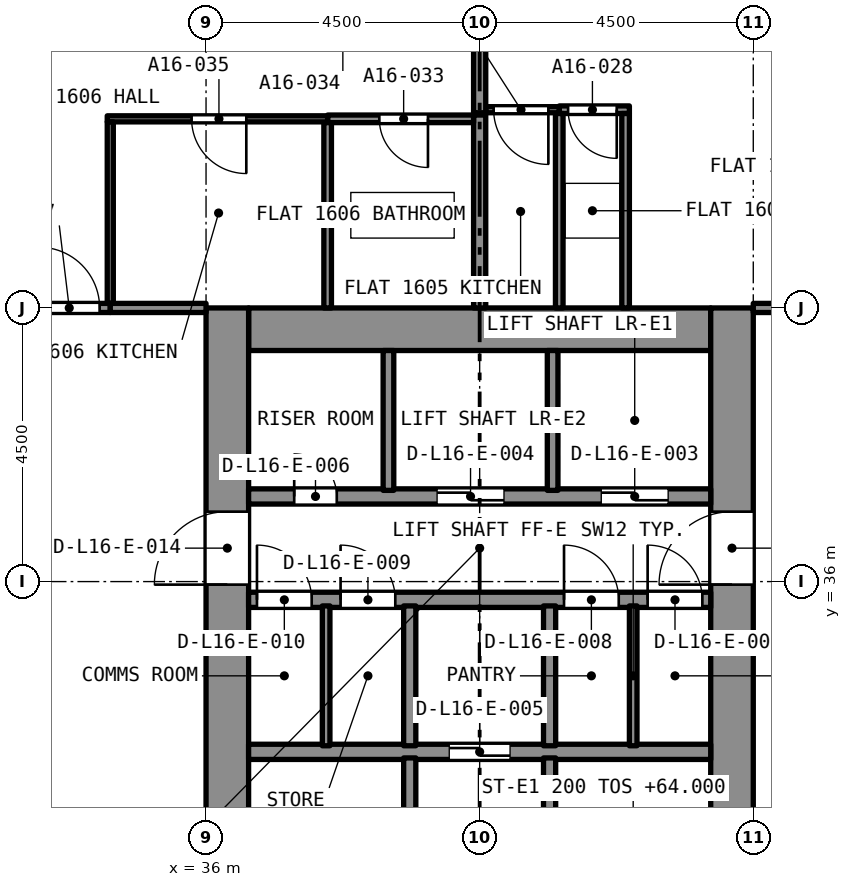
"""IFC4 building model, lengths in metres.
Left out: names, types, materials, properties, quantities, classifications, styles, units other than length and angle.
Written with IfcOpenShell. Run it as: python <this file> out.ifc"""

import sys

from ifc_helpers import new_model, si_unit, direction, frame, frame_2d, origin, place, context, subcontext, project, spatial, rectangle, extrude, element, fill, save


model = new_model("IFC4")
c1 = context("Model", 3, precision=1e-05, world=origin(), true_north=direction((0.0, 1.0)))
c2 = subcontext(c1, "Body", "Model", "MODEL_VIEW")
j1 = project(units=[si_unit("LENGTHUNIT", "METRE"), si_unit("PLANEANGLEUNIT", "RADIAN")], contexts=[c1])
p1 = place(None, origin())
s1 = spatial("IfcSite", under=j1, at=p1, CompositionType="ELEMENT")
p2 = place(p1, origin())
s2 = spatial("IfcBuilding", under=s1, at=p2, CompositionType="ELEMENT")
p3 = place(p2, frame((0.0, 0.0, 62.4)))
s3 = spatial("IfcBuildingStorey", under=s2, at=p3, CompositionType="ELEMENT", Elevation=62.4)
p4 = place(p3, frame((36.7, 40.15, 0.0), z_axis=(0.0, 0.0, 1.0), x_axis=(1.0, 0.0, 0.0)))
e1 = element("IfcWall", 1, at=p4, inside=s3, PredefinedType="SOLIDWALL", context=c2, shape_type="SweptSolid", body=[
    extrude(rectangle(XDim=7.6, YDim=0.7, at=frame_2d((3.8, 0.0))), origin(), (0.0, 0.0, 1.0), 3.2),
])
p5 = place(p3, frame((36.35, 27.0, 0.0), z_axis=(0.0, 0.0, 1.0), x_axis=(0.0, 1.0, 0.0)))
e2 = element("IfcWall", 2, at=p5, inside=s3, PredefinedType="SOLIDWALL", context=c2, shape_type="SweptSolid", body=[
    extrude(rectangle(XDim=13.5, YDim=0.7, at=frame_2d((6.75, 0.0))), origin(), (0.0, 0.0, 1.0), 3.2),
])
p6 = place(p5, frame((8.95, 0.0, 0.0)))
e3 = element("IfcOpeningElement", 3, at=p6, cuts=e2, PredefinedType="OPENING", context=c2, shape_type="SweptSolid", body=[
    extrude(rectangle(XDim=1.2, YDim=2.1, at=frame_2d((0.6, 1.05))), frame((0.0, 0.36, 0.0), z_axis=(0.0, -1.0, 0.0), x_axis=(1.0, 0.0, 0.0)), (0.0, 0.0, 1.0), 0.72),
])
p7 = place(p3, frame((44.65, 27.0, 0.0), z_axis=(0.0, 0.0, 1.0), x_axis=(0.0, 1.0, 0.0)))
e4 = element("IfcWall", 4, at=p7, inside=s3, PredefinedType="SOLIDWALL", context=c2, shape_type="SweptSolid", body=[
    extrude(rectangle(XDim=13.5, YDim=0.7, at=frame_2d((6.75, 0.0))), origin(), (0.0, 0.0, 1.0), 3.2),
])
p8 = place(p7, frame((8.95, 0.0, 0.0)))
e5 = element("IfcOpeningElement", 5, at=p8, cuts=e4, PredefinedType="OPENING", context=c2, shape_type="SweptSolid", body=[
    extrude(rectangle(XDim=1.2, YDim=2.1, at=frame_2d((0.6, 1.05))), frame((0.0, 0.36, 0.0), z_axis=(0.0, -1.0, 0.0), x_axis=(1.0, 0.0, 0.0)), (0.0, 0.0, 1.0), 0.72),
])
p9 = place(p3, frame((42.962, 43.76, 0.0), z_axis=(0.0, 0.0, 1.0), x_axis=(-1.0, 0.0, 0.0)))
e6 = element("IfcWall", 6, at=p9, inside=s3, PredefinedType="PARTITIONING", context=c2, shape_type="SweptSolid", body=[
    extrude(rectangle(XDim=1.153, YDim=0.125, at=frame_2d((0.577, 0.0))), origin(), (0.0, 0.0, 1.0), 2.9),
])
p10 = place(p9, frame((0.208, 0.0, 0.0)))
e7 = element("IfcOpeningElement", 7, at=p10, cuts=e6, PredefinedType="OPENING", context=c2, shape_type="SweptSolid", body=[
    extrude(rectangle(XDim=0.8, YDim=2.1, at=frame_2d((0.4, 1.05))), frame((0.0, 0.073, 0.0), z_axis=(0.0, -1.0, 0.0), x_axis=(1.0, 0.0, 0.0)), (0.0, 0.0, 1.0), 0.145),
])
for number, where, z_axis, x_axis in (
    (8, (42.9, 40.5, 0.0), (0.0, 0.0, 1.0), (0.0, 1.0, 0.0)),
    (9, (41.809, 40.5, 0.0), (0.0, 0.0, 1.0), (0.0, 1.0, 0.0)),
):
    element("IfcWall", number, at=place(p3, frame(where, z_axis=z_axis, x_axis=x_axis)), inside=s3, PredefinedType="PARTITIONING", context=c2, shape_type="SweptSolid", body=[
        extrude(rectangle(XDim=3.198, YDim=0.125, at=frame_2d((1.599, 0.0))), origin(), (0.0, 0.0, 1.0), 2.9),
    ])
p11 = place(p3, frame((41.809, 43.76, 0.0), z_axis=(0.0, 0.0, 1.0), x_axis=(-1.0, 0.0, 0.0)))
e10 = element("IfcWall", 10, at=p11, inside=s3, PredefinedType="PARTITIONING", context=c2, shape_type="SweptSolid", body=[
    extrude(rectangle(XDim=1.209, YDim=0.1, at=frame_2d((0.604, 0.0))), origin(), (0.0, 0.0, 1.0), 2.9),
])
p12 = place(p11, frame((0.179, 0.0, 0.0)))
e11 = element("IfcOpeningElement", 11, at=p12, cuts=e10, PredefinedType="OPENING", context=c2, shape_type="SweptSolid", body=[
    extrude(rectangle(XDim=0.9, YDim=2.1, at=frame_2d((0.45, 1.05))), frame((0.0, 0.06, 0.0), z_axis=(0.0, -1.0, 0.0), x_axis=(1.0, 0.0, 0.0)), (0.0, 0.0, 1.0), 0.12),
])
p13 = place(p3, frame((40.5, 43.71, 0.0), z_axis=(0.0, 0.0, 1.0), x_axis=(0.0, 1.0, 0.0)))
e12 = element("IfcWall", 12, at=p13, inside=s3, PredefinedType="PARTITIONING", context=c2, shape_type="SweptSolid", body=[
    extrude(rectangle(XDim=1.23, YDim=0.2, at=frame_2d((0.615, 0.0))), origin(), (0.0, 0.0, 1.0), 2.9),
])
p14 = place(p3, frame((45.0, 40.5, 0.0), z_axis=(0.0, 0.0, 1.0), x_axis=(1.0, 0.0, 0.0)))
e13 = element("IfcWall", 13, at=p14, inside=s3, PredefinedType="PARTITIONING", context=c2, shape_type="SweptSolid", body=[
    extrude(rectangle(XDim=3.8, YDim=0.15, at=frame_2d((1.9, 0.0))), origin(), (0.0, 0.0, 1.0), 2.9),
])
p15 = place(p14, frame((1.75, 0.0, 0.0)))
e14 = element("IfcOpeningElement", 14, at=p15, cuts=e13, PredefinedType="OPENING", context=c2, shape_type="SweptSolid", body=[
    extrude(rectangle(XDim=1.0, YDim=2.1, at=frame_2d((0.5, 1.05))), frame((0.0, 0.085, 0.0), z_axis=(0.0, -1.0, 0.0), x_axis=(1.0, 0.0, 0.0)), (0.0, 0.0, 1.0), 0.17),
])
p16 = place(p3, frame((40.5, 40.5, 0.0), z_axis=(0.0, 0.0, 1.0), x_axis=(0.0, 1.0, 0.0)))
e15 = element("IfcWall", 15, at=p16, inside=s3, PredefinedType="PARTITIONING", context=c2, shape_type="SweptSolid", body=[
    extrude(rectangle(XDim=3.173, YDim=0.2, at=frame_2d((1.586, 0.0))), origin(), (0.0, 0.0, 1.0), 2.9),
])
p17 = place(p3, frame((40.4, 43.61, 0.0), z_axis=(0.0, 0.0, 1.0), x_axis=(-1.0, 0.0, 0.0)))
e16 = element("IfcWall", 16, at=p17, inside=s3, PredefinedType="PARTITIONING", context=c2, shape_type="SweptSolid", body=[
    extrude(rectangle(XDim=2.4, YDim=0.125, at=frame_2d((1.2, 0.0))), origin(), (0.0, 0.0, 1.0), 2.9),
])
p18 = place(p17, frame((0.75, 0.0, 0.0)))
e17 = element("IfcOpeningElement", 17, at=p18, cuts=e16, PredefinedType="OPENING", context=c2, shape_type="SweptSolid", body=[
    extrude(rectangle(XDim=0.8, YDim=2.1, at=frame_2d((0.4, 1.05))), frame((0.0, 0.073, 0.0), z_axis=(0.0, -1.0, 0.0), x_axis=(1.0, 0.0, 0.0)), (0.0, 0.0, 1.0), 0.145),
])
p19 = place(p3, frame((38.0, 40.5, 0.0), z_axis=(0.0, 0.0, 1.0), x_axis=(0.0, 1.0, 0.0)))
e18 = element("IfcWall", 18, at=p19, inside=s3, PredefinedType="PARTITIONING", context=c2, shape_type="SweptSolid", body=[
    extrude(rectangle(XDim=3.048, YDim=0.125, at=frame_2d((1.524, 0.0))), origin(), (0.0, 0.0, 1.0), 2.9),
])
p20 = place(p3, frame((38.0, 43.61, 0.0), z_axis=(0.0, 0.0, 1.0), x_axis=(-1.0, 0.0, 0.0)))
e19 = element("IfcWall", 19, at=p20, inside=s3, PredefinedType="PARTITIONING", context=c2, shape_type="SweptSolid", body=[
    extrude(rectangle(XDim=3.625, YDim=0.1, at=frame_2d((1.812, 0.0))), origin(), (0.0, 0.0, 1.0), 2.9),
])
p21 = place(p20, frame((1.337, 0.0, 0.0)))
e20 = element("IfcOpeningElement", 20, at=p21, cuts=e19, PredefinedType="OPENING", context=c2, shape_type="SweptSolid", body=[
    extrude(rectangle(XDim=0.9, YDim=2.1, at=frame_2d((0.45, 1.05))), frame((0.0, 0.06, 0.0), z_axis=(0.0, -1.0, 0.0), x_axis=(1.0, 0.0, 0.0)), (0.0, 0.0, 1.0), 0.12),
])
p22 = place(p3, frame((34.425, 40.575, 0.0), z_axis=(0.0, 0.0, 1.0), x_axis=(0.0, 1.0, 0.0)))
e21 = element("IfcWall", 21, at=p22, inside=s3, PredefinedType="PARTITIONING", context=c2, shape_type="SweptSolid", body=[
    extrude(rectangle(XDim=2.985, YDim=0.1, at=frame_2d((1.493, 0.0))), origin(), (0.0, 0.0, 1.0), 2.9),
])
p23 = place(p3, frame((32.2, 40.5, 0.0), z_axis=(0.0, 0.0, 1.0), x_axis=(1.0, 0.0, 0.0)))
e22 = element("IfcWall", 22, at=p23, inside=s3, PredefinedType="PARTITIONING", context=c2, shape_type="SweptSolid", body=[
    extrude(rectangle(XDim=2.225, YDim=0.15, at=frame_2d((1.113, 0.0))), origin(), (0.0, 0.0, 1.0), 2.9),
])
p24 = place(p23, frame((1.05, 0.0, 0.0)))
e23 = element("IfcOpeningElement", 23, at=p24, cuts=e22, PredefinedType="OPENING", context=c2, shape_type="SweptSolid", body=[
    extrude(rectangle(XDim=1.0, YDim=2.1, at=frame_2d((0.5, 1.05))), frame((0.0, 0.085, 0.0), z_axis=(0.0, -1.0, 0.0), x_axis=(1.0, 0.0, 0.0)), (0.0, 0.0, 1.0), 0.17),
])
p25 = place(p3, frame((34.425, 40.5, 0.0), z_axis=(0.0, 0.0, 1.0), x_axis=(1.0, 0.0, 0.0)))
e24 = element("IfcWall", 24, at=p25, inside=s3, PredefinedType="PARTITIONING", context=c2, shape_type="SweptSolid", body=[
    extrude(rectangle(XDim=1.575, YDim=0.15, at=frame_2d((0.788, 0.0))), origin(), (0.0, 0.0, 1.0), 2.9),
])
p26 = place(p3, frame((36.7, 33.2, 0.0), z_axis=(0.0, 0.0, 1.0), x_axis=(1.0, 0.0, 0.0)))
e25 = element("IfcWall", 25, at=p26, inside=s3, PredefinedType="SOLIDWALL", context=c2, shape_type="SweptSolid", body=[
    extrude(rectangle(XDim=7.6, YDim=0.25, at=frame_2d((3.8, 0.0))), origin(), (0.0, 0.0, 1.0), 2.9),
])
p27 = place(p26, frame((3.3, 0.0, 0.0)))
e26 = element("IfcOpeningElement", 26, at=p27, cuts=e25, PredefinedType="OPENING", context=c2, shape_type="SweptSolid", body=[
    extrude(rectangle(XDim=1.0, YDim=2.1, at=frame_2d((0.5, 1.05))), frame((0.0, 0.135, 0.0), z_axis=(0.0, -1.0, 0.0), x_axis=(1.0, 0.0, 0.0)), (0.0, 0.0, 1.0), 0.27),
])
p28 = place(p3, frame((36.7, 35.7, 0.0), z_axis=(0.0, 0.0, 1.0), x_axis=(1.0, 0.0, 0.0)))
e27 = element("IfcWall", 27, at=p28, inside=s3, PredefinedType="SOLIDWALL", context=c2, shape_type="SweptSolid", body=[
    extrude(rectangle(XDim=7.6, YDim=0.25, at=frame_2d((3.8, 0.0))), origin(), (0.0, 0.0, 1.0), 2.9),
])
p29 = place(p28, frame((6.562, 0.0, 0.0)))
e28 = element("IfcOpeningElement", 28, at=p29, cuts=e27, PredefinedType="OPENING", context=c2, shape_type="SweptSolid", body=[
    extrude(rectangle(XDim=0.9, YDim=2.1, at=frame_2d((0.45, 1.05))), frame((0.0, 0.135, 0.0), z_axis=(0.0, -1.0, 0.0), x_axis=(1.0, 0.0, 0.0)), (0.0, 0.0, 1.0), 0.27),
])
p30 = place(p28, frame((5.188, 0.0, 0.0)))
e29 = element("IfcOpeningElement", 29, at=p30, cuts=e27, PredefinedType="OPENING", context=c2, shape_type="SweptSolid", body=[
    extrude(rectangle(XDim=0.9, YDim=2.1, at=frame_2d((0.45, 1.05))), frame((0.0, 0.135, 0.0), z_axis=(0.0, -1.0, 0.0), x_axis=(1.0, 0.0, 0.0)), (0.0, 0.0, 1.0), 0.27),
])
p31 = place(p28, frame((1.512, 0.0, 0.0)))
e30 = element("IfcOpeningElement", 30, at=p31, cuts=e27, PredefinedType="OPENING", context=c2, shape_type="SweptSolid", body=[
    extrude(rectangle(XDim=0.9, YDim=2.1, at=frame_2d((0.45, 1.05))), frame((0.0, 0.135, 0.0), z_axis=(0.0, -1.0, 0.0), x_axis=(1.0, 0.0, 0.0)), (0.0, 0.0, 1.0), 0.27),
])
p32 = place(p28, frame((0.137, 0.0, 0.0)))
e31 = element("IfcOpeningElement", 31, at=p32, cuts=e27, PredefinedType="OPENING", context=c2, shape_type="SweptSolid", body=[
    extrude(rectangle(XDim=0.9, YDim=2.1, at=frame_2d((0.45, 1.05))), frame((0.0, 0.135, 0.0), z_axis=(0.0, -1.0, 0.0), x_axis=(1.0, 0.0, 0.0)), (0.0, 0.0, 1.0), 0.27),
])
p33 = place(p3, frame((36.7, 37.4, 0.0), z_axis=(0.0, 0.0, 1.0), x_axis=(1.0, 0.0, 0.0)))
e32 = element("IfcWall", 32, at=p33, inside=s3, PredefinedType="SOLIDWALL", context=c2, shape_type="SweptSolid", body=[
    extrude(rectangle(XDim=7.6, YDim=0.25, at=frame_2d((3.8, 0.0))), origin(), (0.0, 0.0, 1.0), 2.9),
])
p34 = place(p33, frame((5.8, 0.0, 0.0)))
e33 = element("IfcOpeningElement", 33, at=p34, cuts=e32, PredefinedType="OPENING", context=c2, shape_type="SweptSolid", body=[
    extrude(rectangle(XDim=1.1, YDim=2.4, at=frame_2d((0.55, 1.2))), frame((0.0, 0.135, 0.0), z_axis=(0.0, -1.0, 0.0), x_axis=(1.0, 0.0, 0.0)), (0.0, 0.0, 1.0), 0.27),
])
p35 = place(p33, frame((3.1, 0.0, 0.0)))
e34 = element("IfcOpeningElement", 34, at=p35, cuts=e32, PredefinedType="OPENING", context=c2, shape_type="SweptSolid", body=[
    extrude(rectangle(XDim=1.1, YDim=2.4, at=frame_2d((0.55, 1.2))), frame((0.0, 0.135, 0.0), z_axis=(0.0, -1.0, 0.0), x_axis=(1.0, 0.0, 0.0)), (0.0, 0.0, 1.0), 0.27),
])
p36 = place(p33, frame((0.75, 0.0, 0.0)))
e35 = element("IfcOpeningElement", 35, at=p36, cuts=e32, PredefinedType="OPENING", context=c2, shape_type="SweptSolid", body=[
    extrude(rectangle(XDim=0.7, YDim=2.1, at=frame_2d((0.35, 1.05))), frame((0.0, 0.135, 0.0), z_axis=(0.0, -1.0, 0.0), x_axis=(1.0, 0.0, 0.0)), (0.0, 0.0, 1.0), 0.27),
])
p37 = place(p3, frame((41.65, 27.7, 0.0), z_axis=(0.0, 0.0, 1.0), x_axis=(0.0, 1.0, 0.0)))
e36 = element("IfcWall", 36, at=p37, inside=s3, PredefinedType="SOLIDWALL", context=c2, shape_type="SweptSolid", body=[
    extrude(rectangle(XDim=5.4, YDim=0.2, at=frame_2d((2.7, 0.0))), origin(), (0.0, 0.0, 1.0), 2.9),
])
p38 = place(p37, frame((0.2, 0.0, 0.0)))
e37 = element("IfcOpeningElement", 37, at=p38, cuts=e36, PredefinedType="OPENING", context=c2, shape_type="SweptSolid", body=[
    extrude(rectangle(XDim=0.9, YDim=2.1, at=frame_2d((0.45, 1.05))), frame((0.0, 0.11, 0.0), z_axis=(0.0, -1.0, 0.0), x_axis=(1.0, 0.0, 0.0)), (0.0, 0.0, 1.0), 0.22),
])
p39 = place(p3, frame((39.35, 27.7, 0.0), z_axis=(0.0, 0.0, 1.0), x_axis=(0.0, 1.0, 0.0)))
e38 = element("IfcWall", 38, at=p39, inside=s3, PredefinedType="SOLIDWALL", context=c2, shape_type="SweptSolid", body=[
    extrude(rectangle(XDim=5.4, YDim=0.2, at=frame_2d((2.7, 0.0))), origin(), (0.0, 0.0, 1.0), 2.9),
])
p40 = place(p39, frame((0.2, 0.0, 0.0)))
e39 = element("IfcOpeningElement", 39, at=p40, cuts=e38, PredefinedType="OPENING", context=c2, shape_type="SweptSolid", body=[
    extrude(rectangle(XDim=0.9, YDim=2.1, at=frame_2d((0.45, 1.05))), frame((0.0, 0.11, 0.0), z_axis=(0.0, -1.0, 0.0), x_axis=(1.0, 0.0, 0.0)), (0.0, 0.0, 1.0), 0.22),
])
for number, where, z_axis, x_axis in (
    (40, (41.65, 33.3, 0.0), (0.0, 0.0, 1.0), (0.0, 1.0, 0.0)),
    (41, (39.35, 33.3, 0.0), (0.0, 0.0, 1.0), (0.0, 1.0, 0.0)),
):
    element("IfcWall", number, at=place(p3, frame(where, z_axis=z_axis, x_axis=x_axis)), inside=s3, PredefinedType="SOLIDWALL", context=c2, shape_type="SweptSolid", body=[
        extrude(rectangle(XDim=2.3, YDim=0.2, at=frame_2d((1.15, 0.0))), origin(), (0.0, 0.0, 1.0), 2.9),
    ])
for number, where, z_axis, x_axis in (
    (42, (41.7, 37.5, 0.0), (0.0, 0.0, 1.0), (0.0, 1.0, 0.0)),
    (43, (39.0, 37.5, 0.0), (0.0, 0.0, 1.0), (0.0, 1.0, 0.0)),
):
    element("IfcWall", number, at=place(p3, frame(where, z_axis=z_axis, x_axis=x_axis)), inside=s3, PredefinedType="SOLIDWALL", context=c2, shape_type="SweptSolid", body=[
        extrude(rectangle(XDim=2.3, YDim=0.175, at=frame_2d((1.15, 0.0))), origin(), (0.0, 0.0, 1.0), 2.9),
    ])
for number, where, z_axis, x_axis in (
    (44, (43.025, 33.3, 0.0), (0.0, 0.0, 1.0), (0.0, 1.0, 0.0)),
    (45, (37.975, 33.3, 0.0), (0.0, 0.0, 1.0), (0.0, 1.0, 0.0)),
):
    element("IfcWall", number, at=place(p3, frame(where, z_axis=z_axis, x_axis=x_axis)), inside=s3, PredefinedType="PARTITIONING", context=c2, shape_type="SweptSolid", body=[
        extrude(rectangle(XDim=2.3, YDim=0.125, at=frame_2d((1.15, 0.0))), origin(), (0.0, 0.0, 1.0), 2.9),
    ])
p41 = place(p10, origin())
e46 = element("IfcDoor", 46, at=p41, inside=s3, OperationType="SINGLE_SWING_RIGHT", PredefinedType="DOOR", context=c2, shape_type="SweptSolid", body=[
    extrude(rectangle(XDim=0.8, YDim=2.1, at=frame_2d((0.4, 1.05))), frame((0.0, 0.025, 0.0), z_axis=(0.0, -1.0, 0.0), x_axis=(1.0, 0.0, 0.0)), (0.0, 0.0, 1.0), 0.05),
])
fill(e7, e46)
p42 = place(p12, origin())
e47 = element("IfcDoor", 47, at=p42, inside=s3, OperationType="SINGLE_SWING_RIGHT", PredefinedType="DOOR", context=c2, shape_type="SweptSolid", body=[
    extrude(rectangle(XDim=0.9, YDim=2.1, at=frame_2d((0.45, 1.05))), frame((0.0, 0.025, 0.0), z_axis=(0.0, -1.0, 0.0), x_axis=(1.0, 0.0, 0.0)), (0.0, 0.0, 1.0), 0.05),
])
fill(e11, e47)
p43 = place(p18, origin())
e48 = element("IfcDoor", 48, at=p43, inside=s3, OperationType="SINGLE_SWING_LEFT", PredefinedType="DOOR", context=c2, shape_type="SweptSolid", body=[
    extrude(rectangle(XDim=0.8, YDim=2.1, at=frame_2d((0.4, 1.05))), frame((0.0, 0.025, 0.0), z_axis=(0.0, -1.0, 0.0), x_axis=(1.0, 0.0, 0.0)), (0.0, 0.0, 1.0), 0.05),
])
fill(e17, e48)
p44 = place(p21, origin())
e49 = element("IfcDoor", 49, at=p44, inside=s3, OperationType="SINGLE_SWING_LEFT", PredefinedType="DOOR", context=c2, shape_type="SweptSolid", body=[
    extrude(rectangle(XDim=0.9, YDim=2.1, at=frame_2d((0.45, 1.05))), frame((0.0, 0.025, 0.0), z_axis=(0.0, -1.0, 0.0), x_axis=(1.0, 0.0, 0.0)), (0.0, 0.0, 1.0), 0.05),
])
fill(e20, e49)
p45 = place(p24, origin())
e50 = element("IfcDoor", 50, at=p45, inside=s3, OperationType="SINGLE_SWING_RIGHT", PredefinedType="DOOR", context=c2, shape_type="SweptSolid", body=[
    extrude(rectangle(XDim=1.0, YDim=2.1, at=frame_2d((0.5, 1.05))), frame((0.0, 0.025, 0.0), z_axis=(0.0, -1.0, 0.0), x_axis=(1.0, 0.0, 0.0)), (0.0, 0.0, 1.0), 0.05),
])
fill(e23, e50)
p46 = place(p34, origin())
e51 = element("IfcDoor", 51, at=p46, inside=s3, OperationType="SLIDING_TO_LEFT", PredefinedType="DOOR", context=c2, shape_type="SweptSolid", body=[
    extrude(rectangle(XDim=1.1, YDim=2.4, at=frame_2d((0.55, 1.2))), frame((0.0, 0.025, 0.0), z_axis=(0.0, -1.0, 0.0), x_axis=(1.0, 0.0, 0.0)), (0.0, 0.0, 1.0), 0.05),
])
fill(e33, e51)
p47 = place(p35, origin())
e52 = element("IfcDoor", 52, at=p47, inside=s3, OperationType="SLIDING_TO_LEFT", PredefinedType="DOOR", context=c2, shape_type="SweptSolid", body=[
    extrude(rectangle(XDim=1.1, YDim=2.4, at=frame_2d((0.55, 1.2))), frame((0.0, 0.025, 0.0), z_axis=(0.0, -1.0, 0.0), x_axis=(1.0, 0.0, 0.0)), (0.0, 0.0, 1.0), 0.05),
])
fill(e34, e52)
p48 = place(p27, origin())
e53 = element("IfcDoor", 53, at=p48, inside=s3, OperationType="SLIDING_TO_LEFT", PredefinedType="DOOR", context=c2, shape_type="SweptSolid", body=[
    extrude(rectangle(XDim=1.0, YDim=2.1, at=frame_2d((0.5, 1.05))), frame((0.0, 0.025, 0.0), z_axis=(0.0, -1.0, 0.0), x_axis=(1.0, 0.0, 0.0)), (0.0, 0.0, 1.0), 0.05),
])
fill(e26, e53)
p49 = place(p36, origin())
e54 = element("IfcDoor", 54, at=p49, inside=s3, OperationType="SINGLE_SWING_LEFT", PredefinedType="DOOR", context=c2, shape_type="SweptSolid", body=[
    extrude(rectangle(XDim=0.7, YDim=2.1, at=frame_2d((0.35, 1.05))), frame((0.0, 0.025, 0.0), z_axis=(0.0, -1.0, 0.0), x_axis=(1.0, 0.0, 0.0)), (0.0, 0.0, 1.0), 0.05),
])
fill(e35, e54)
p50 = place(p29, origin())
e55 = element("IfcDoor", 55, at=p50, inside=s3, OperationType="SINGLE_SWING_LEFT", PredefinedType="DOOR", context=c2, shape_type="SweptSolid", body=[
    extrude(rectangle(XDim=0.9, YDim=2.1, at=frame_2d((0.45, 1.05))), frame((0.0, 0.025, 0.0), z_axis=(0.0, -1.0, 0.0), x_axis=(1.0, 0.0, 0.0)), (0.0, 0.0, 1.0), 0.05),
])
fill(e28, e55)
p51 = place(p30, origin())
e56 = element("IfcDoor", 56, at=p51, inside=s3, OperationType="SINGLE_SWING_LEFT", PredefinedType="DOOR", context=c2, shape_type="SweptSolid", body=[
    extrude(rectangle(XDim=0.9, YDim=2.1, at=frame_2d((0.45, 1.05))), frame((0.0, 0.025, 0.0), z_axis=(0.0, -1.0, 0.0), x_axis=(1.0, 0.0, 0.0)), (0.0, 0.0, 1.0), 0.05),
])
fill(e29, e56)
p52 = place(p31, origin())
e57 = element("IfcDoor", 57, at=p52, inside=s3, OperationType="SINGLE_SWING_LEFT", PredefinedType="DOOR", context=c2, shape_type="SweptSolid", body=[
    extrude(rectangle(XDim=0.9, YDim=2.1, at=frame_2d((0.45, 1.05))), frame((0.0, 0.025, 0.0), z_axis=(0.0, -1.0, 0.0), x_axis=(1.0, 0.0, 0.0)), (0.0, 0.0, 1.0), 0.05),
])
fill(e30, e57)
p53 = place(p32, origin())
e58 = element("IfcDoor", 58, at=p53, inside=s3, OperationType="SINGLE_SWING_LEFT", PredefinedType="DOOR", context=c2, shape_type="SweptSolid", body=[
    extrude(rectangle(XDim=0.9, YDim=2.1, at=frame_2d((0.45, 1.05))), frame((0.0, 0.025, 0.0), z_axis=(0.0, -1.0, 0.0), x_axis=(1.0, 0.0, 0.0)), (0.0, 0.0, 1.0), 0.05),
])
fill(e31, e58)
p54 = place(p6, origin())
e59 = element("IfcDoor", 59, at=p54, inside=s3, OperationType="SINGLE_SWING_LEFT", PredefinedType="DOOR", context=c2, shape_type="SweptSolid", body=[
    extrude(rectangle(XDim=1.2, YDim=2.1, at=frame_2d((0.6, 1.05))), frame((0.0, 0.025, 0.0), z_axis=(0.0, -1.0, 0.0), x_axis=(1.0, 0.0, 0.0)), (0.0, 0.0, 1.0), 0.05),
])
fill(e3, e59)
p55 = place(p8, origin())
e60 = element("IfcDoor", 60, at=p55, inside=s3, OperationType="SINGLE_SWING_LEFT", PredefinedType="DOOR", context=c2, shape_type="SweptSolid", body=[
    extrude(rectangle(XDim=1.2, YDim=2.1, at=frame_2d((0.6, 1.05))), frame((0.0, 0.025, 0.0), z_axis=(0.0, -1.0, 0.0), x_axis=(1.0, 0.0, 0.0)), (0.0, 0.0, 1.0), 0.05),
])
fill(e5, e60)
save(model, sys.argv[1])
